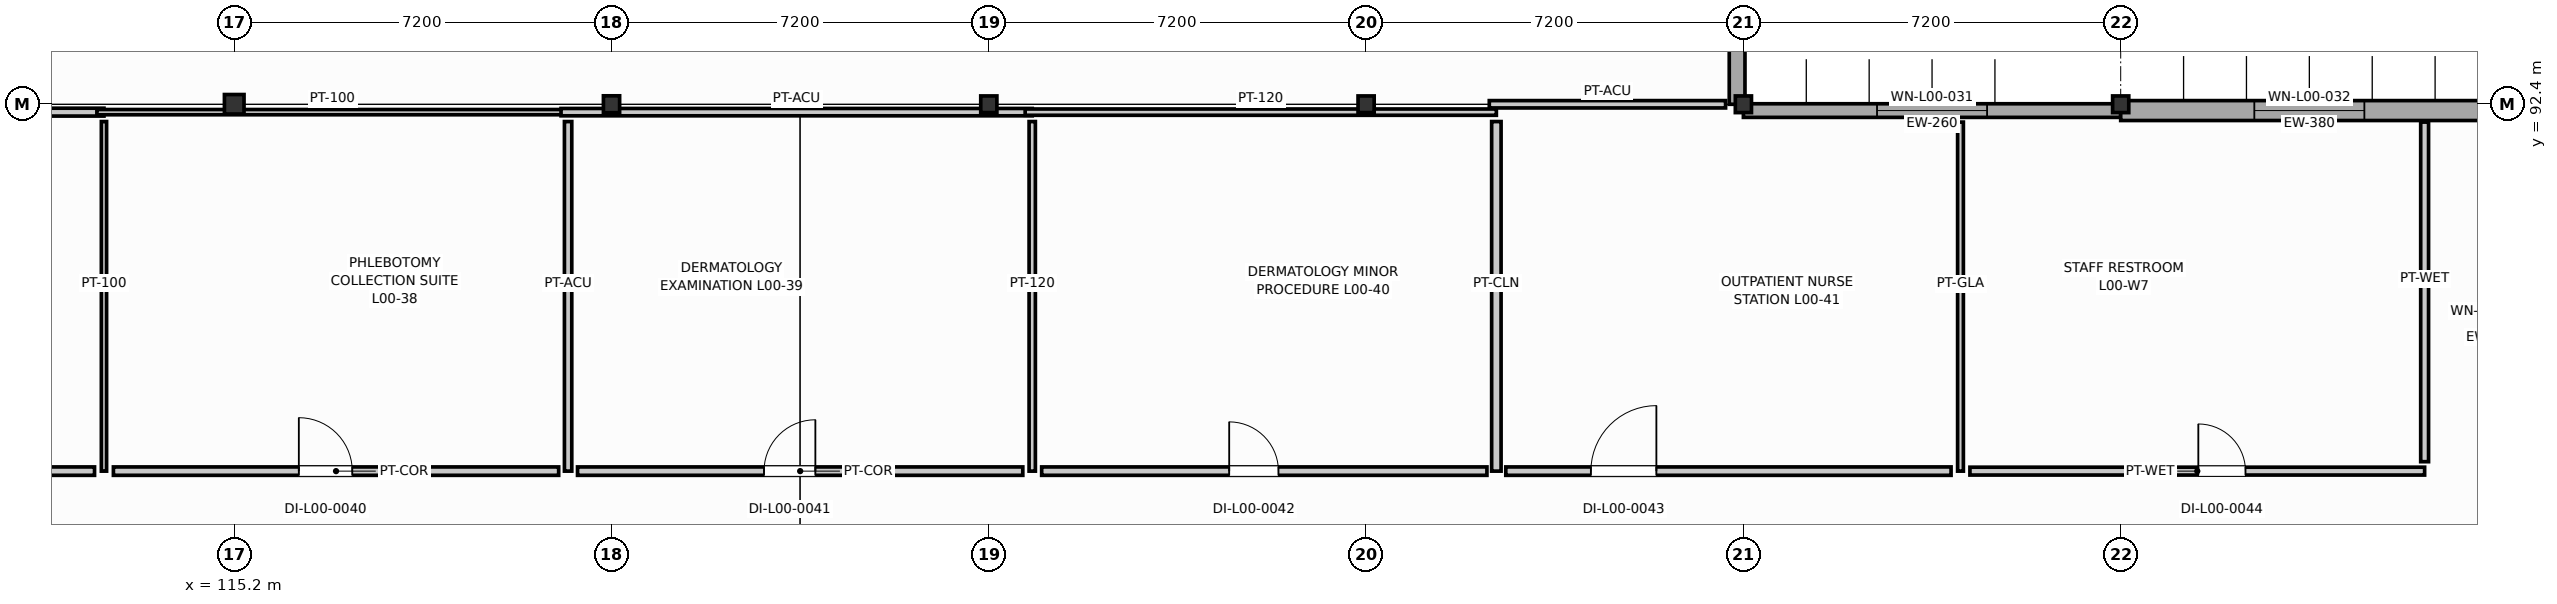
"""IFC4 building model, lengths in metres.
Left out: names, types, materials, properties, quantities, classifications, styles, units other than length and angle.
Written with IfcOpenShell. Run it as: python <this file> out.ifc"""

import sys

from ifc_helpers import new_model, si_unit, direction, frame, frame_2d, origin, origin_2d, place, context, subcontext, project, spatial, rectangle, i_section, extrude, element, fill, save


model = new_model("IFC4")
c1 = context("Model", 3, precision=1e-05, world=origin(), true_north=direction((0.0, 1.0)))
c2 = subcontext(c1, "Body", "Model", "MODEL_VIEW")
j1 = project(units=[si_unit("LENGTHUNIT", "METRE"), si_unit("PLANEANGLEUNIT", "RADIAN")], contexts=[c1])
p1 = place(None, origin())
s1 = spatial("IfcSite", under=j1, at=p1, CompositionType="ELEMENT")
p2 = place(p1, origin())
s2 = spatial("IfcBuilding", under=s1, at=p2, CompositionType="ELEMENT")
p3 = place(p2, origin())
s3 = spatial("IfcBuildingStorey", under=s2, at=p3, CompositionType="ELEMENT", Elevation=0.0)
p4 = place(p3, frame((115.2, 92.4, 0.0), z_axis=(0.0, 0.0, 1.0), x_axis=(1.0, 0.0, 0.0)))
e1 = element("IfcColumn", 1, at=p4, inside=s3, PredefinedType="COLUMN", context=c2, shape_type="SweptSolid", body=[
    extrude(i_section(OverallWidth=0.374, OverallDepth=0.372, WebThickness=0.016, FlangeThickness=0.026, FilletRadius=0.02, at=origin_2d()), origin(), (0.0, 0.0, 1.0), 4.8),
])
p5 = place(p3, frame((122.4, 92.4, 0.0), z_axis=(0.0, 0.0, 1.0), x_axis=(1.0, 0.0, 0.0)))
e2 = element("IfcColumn", 2, at=p5, inside=s3, PredefinedType="COLUMN", context=c2, shape_type="SweptSolid", body=[
    extrude(i_section(OverallWidth=0.309, OverallDepth=0.323, WebThickness=0.014, FlangeThickness=0.023, FilletRadius=0.016, at=origin_2d()), origin(), (0.0, 0.0, 1.0), 4.8),
])
for number, where, z_axis, x_axis in (
    (3, (129.6, 92.4, 0.0), (0.0, 0.0, 1.0), (1.0, 0.0, 0.0)),
    (4, (136.8, 92.4, 0.0), (0.0, 0.0, 1.0), (1.0, 0.0, 0.0)),
    (5, (144.0, 92.4, 0.0), (0.0, 0.0, 1.0), (1.0, 0.0, 0.0)),
    (6, (151.2, 92.4, 0.0), (0.0, 0.0, 1.0), (1.0, 0.0, 0.0)),
):
    element("IfcColumn", number, at=place(p3, frame(where, z_axis=z_axis, x_axis=x_axis)), inside=s3, PredefinedType="COLUMN", context=c2, shape_type="SweptSolid", body=[
        extrude(i_section(OverallWidth=0.308, OverallDepth=0.318, WebThickness=0.013, FlangeThickness=0.021, FilletRadius=0.016, at=origin_2d()), origin(), (0.0, 0.0, 1.0), 4.8),
    ])
p6 = place(p3, frame((143.88, 92.4, 0.0), z_axis=(0.0, 0.0, 1.0), x_axis=(0.0, 1.0, 0.0)))
e7 = element("IfcWall", 7, at=p6, inside=s3, PredefinedType="SOLIDWALL", context=c2, shape_type="SweptSolid", body=[
    extrude(rectangle(XDim=8.4, YDim=0.3, at=frame_2d((4.2, 0.0))), origin(), (0.0, 0.0, 1.0), 3.772),
])
p7 = place(p6, frame((3.15, 0.0, 0.95)))
e8 = element("IfcOpeningElement", 8, at=p7, cuts=e7, PredefinedType="OPENING", context=c2, shape_type="SweptSolid", body=[
    extrude(rectangle(XDim=2.1, YDim=1.15, at=frame_2d((1.05, 0.575))), frame((0.0, 0.16, 0.0), z_axis=(0.0, -1.0, 0.0), x_axis=(1.0, 0.0, 0.0)), (0.0, 0.0, 1.0), 0.32),
])
p8 = place(p3, frame((144.0, 92.28, 0.0), z_axis=(0.0, 0.0, 1.0), x_axis=(1.0, 0.0, 0.0)))
e9 = element("IfcWall", 9, at=p8, inside=s3, PredefinedType="SOLIDWALL", context=c2, shape_type="SweptSolid", body=[
    extrude(rectangle(XDim=7.2, YDim=0.26, at=frame_2d((3.6, 0.0))), origin(), (0.0, 0.0, 1.0), 4.082),
])
p9 = place(p8, frame((2.55, 0.0, 0.95)))
e10 = element("IfcOpeningElement", 10, at=p9, cuts=e9, PredefinedType="OPENING", context=c2, shape_type="SweptSolid", body=[
    extrude(rectangle(XDim=2.1, YDim=1.55, at=frame_2d((1.05, 0.775))), frame((0.0, 0.14, 0.0), z_axis=(0.0, -1.0, 0.0), x_axis=(1.0, 0.0, 0.0)), (0.0, 0.0, 1.0), 0.28),
])
p10 = place(p3, frame((151.2, 92.28, 0.0), z_axis=(0.0, 0.0, 1.0), x_axis=(1.0, 0.0, 0.0)))
e11 = element("IfcWall", 11, at=p10, inside=s3, PredefinedType="SOLIDWALL", context=c2, shape_type="SweptSolid", body=[
    extrude(rectangle(XDim=7.2, YDim=0.38, at=frame_2d((3.6, 0.0))), origin(), (0.0, 0.0, 1.0), 4.082),
])
p11 = place(p10, frame((2.55, 0.0, 0.95)))
e12 = element("IfcOpeningElement", 12, at=p11, cuts=e11, PredefinedType="OPENING", context=c2, shape_type="SweptSolid", body=[
    extrude(rectangle(XDim=2.1, YDim=1.75, at=frame_2d((1.05, 0.875))), frame((0.0, 0.2, 0.0), z_axis=(0.0, -1.0, 0.0), x_axis=(1.0, 0.0, 0.0)), (0.0, 0.0, 1.0), 0.4),
])
p12 = place(p3, frame((103.722, 92.25, 0.0), z_axis=(0.0, 0.0, 1.0), x_axis=(1.0, 0.0, 0.0)))
e13 = element("IfcWall", 13, at=p12, inside=s3, PredefinedType="PLUMBINGWALL", context=c2, shape_type="SweptSolid", body=[
    extrude(rectangle(XDim=8.992, YDim=0.15, at=frame_2d((4.496, 0.0))), origin(), (0.0, 0.0, 1.0), 3.928),
])
p13 = place(p3, frame((112.714, 92.07, 0.0), z_axis=(0.0, 0.0, 1.0), x_axis=(0.0, -1.0, 0.0)))
e14 = element("IfcWall", 14, at=p13, inside=s3, PredefinedType="PARTITIONING", context=c2, shape_type="SweptSolid", body=[
    extrude(rectangle(XDim=6.67, YDim=0.1, at=frame_2d((3.335, 0.0))), origin(), (0.0, 0.0, 1.0), 4.545),
])
p14 = place(p3, frame((112.534, 85.4, 0.0), z_axis=(0.0, 0.0, 1.0), x_axis=(-1.0, 0.0, 0.0)))
e15 = element("IfcWall", 15, at=p14, inside=s3, PredefinedType="PARTITIONING", context=c2, shape_type="SweptSolid", body=[
    extrude(rectangle(XDim=8.497, YDim=0.16, at=frame_2d((4.249, 0.0))), origin(), (0.0, 0.0, 1.0), 3.928),
])
p15 = place(p14, frame((2.519, 0.0, 0.0)))
e16 = element("IfcOpeningElement", 16, at=p15, cuts=e15, PredefinedType="OPENING", context=c2, shape_type="SweptSolid", body=[
    extrude(rectangle(XDim=1.06, YDim=2.05, at=frame_2d((0.53, 1.025))), frame((0.0, 0.09, 0.0), z_axis=(0.0, -1.0, 0.0), x_axis=(1.0, 0.0, 0.0)), (0.0, 0.0, 1.0), 0.18),
])
p16 = place(p3, frame((112.579, 92.25, 0.0), z_axis=(0.0, 0.0, 1.0), x_axis=(1.0, 0.0, 0.0)))
e17 = element("IfcWall", 17, at=p16, inside=s3, PredefinedType="PARTITIONING", context=c2, shape_type="SweptSolid", body=[
    extrude(rectangle(XDim=8.992, YDim=0.1, at=frame_2d((4.496, 0.0))), origin(), (0.0, 0.0, 1.0), 3.694),
])
p17 = place(p3, frame((121.571, 92.07, 0.0), z_axis=(0.0, 0.0, 1.0), x_axis=(0.0, -1.0, 0.0)))
e18 = element("IfcWall", 18, at=p17, inside=s3, PredefinedType="PARTITIONING", context=c2, shape_type="SweptSolid", body=[
    extrude(rectangle(XDim=6.67, YDim=0.14, at=frame_2d((3.335, 0.0))), origin(), (0.0, 0.0, 1.0), 4.545),
])
p18 = place(p3, frame((121.391, 85.4, 0.0), z_axis=(0.0, 0.0, 1.0), x_axis=(-1.0, 0.0, 0.0)))
e19 = element("IfcWall", 19, at=p18, inside=s3, PredefinedType="PARTITIONING", context=c2, shape_type="SweptSolid", body=[
    extrude(rectangle(XDim=8.497, YDim=0.16, at=frame_2d((4.249, 0.0))), origin(), (0.0, 0.0, 1.0), 3.694),
])
p19 = place(p18, frame((3.938, 0.0, 0.0)))
e20 = element("IfcOpeningElement", 20, at=p19, cuts=e19, PredefinedType="OPENING", context=c2, shape_type="SweptSolid", body=[
    extrude(rectangle(XDim=1.02, YDim=2.05, at=frame_2d((0.51, 1.025))), frame((0.0, 0.09, 0.0), z_axis=(0.0, -1.0, 0.0), x_axis=(1.0, 0.0, 0.0)), (0.0, 0.0, 1.0), 0.18),
])
p20 = place(p3, frame((121.436, 92.25, 0.0), z_axis=(0.0, 0.0, 1.0), x_axis=(1.0, 0.0, 0.0)))
e21 = element("IfcWall", 21, at=p20, inside=s3, PredefinedType="PARTITIONING", context=c2, shape_type="SweptSolid", body=[
    extrude(rectangle(XDim=8.992, YDim=0.14, at=frame_2d((4.496, 0.0))), origin(), (0.0, 0.0, 1.0), 3.618),
])
p21 = place(p3, frame((130.429, 92.07, 0.0), z_axis=(0.0, 0.0, 1.0), x_axis=(0.0, -1.0, 0.0)))
e22 = element("IfcWall", 22, at=p21, inside=s3, PredefinedType="PARTITIONING", context=c2, shape_type="SweptSolid", body=[
    extrude(rectangle(XDim=6.67, YDim=0.12, at=frame_2d((3.335, 0.0))), origin(), (0.0, 0.0, 1.0), 4.545),
])
p22 = place(p3, frame((130.249, 85.4, 0.0), z_axis=(0.0, 0.0, 1.0), x_axis=(-1.0, 0.0, 0.0)))
e23 = element("IfcWall", 23, at=p22, inside=s3, PredefinedType="PARTITIONING", context=c2, shape_type="SweptSolid", body=[
    extrude(rectangle(XDim=8.497, YDim=0.16, at=frame_2d((4.249, 0.0))), origin(), (0.0, 0.0, 1.0), 4.001),
])
p23 = place(p22, frame((3.958, 0.0, 0.0)))
e24 = element("IfcOpeningElement", 24, at=p23, cuts=e23, PredefinedType="OPENING", context=c2, shape_type="SweptSolid", body=[
    extrude(rectangle(XDim=0.98, YDim=2.05, at=frame_2d((0.49, 1.025))), frame((0.0, 0.09, 0.0), z_axis=(0.0, -1.0, 0.0), x_axis=(1.0, 0.0, 0.0)), (0.0, 0.0, 1.0), 0.18),
])
p24 = place(p3, frame((130.294, 92.25, 0.0), z_axis=(0.0, 0.0, 1.0), x_axis=(1.0, 0.0, 0.0)))
e25 = element("IfcWall", 25, at=p24, inside=s3, PredefinedType="PARTITIONING", context=c2, shape_type="SweptSolid", body=[
    extrude(rectangle(XDim=8.992, YDim=0.12, at=frame_2d((4.496, 0.0))), origin(), (0.0, 0.0, 1.0), 3.618),
])
p25 = place(p3, frame((139.286, 92.07, 0.0), z_axis=(0.0, 0.0, 1.0), x_axis=(0.0, -1.0, 0.0)))
e26 = element("IfcWall", 26, at=p25, inside=s3, PredefinedType="PARTITIONING", context=c2, shape_type="SweptSolid", body=[
    extrude(rectangle(XDim=6.67, YDim=0.18, at=frame_2d((3.335, 0.0))), origin(), (0.0, 0.0, 1.0), 4.545),
])
p26 = place(p3, frame((139.106, 85.4, 0.0), z_axis=(0.0, 0.0, 1.0), x_axis=(-1.0, 0.0, 0.0)))
e27 = element("IfcWall", 27, at=p26, inside=s3, PredefinedType="PARTITIONING", context=c2, shape_type="SweptSolid", body=[
    extrude(rectangle(XDim=8.497, YDim=0.16, at=frame_2d((4.249, 0.0))), origin(), (0.0, 0.0, 1.0), 3.694),
])
p27 = place(p26, frame((3.979, 0.0, 0.0)))
e28 = element("IfcOpeningElement", 28, at=p27, cuts=e27, PredefinedType="OPENING", context=c2, shape_type="SweptSolid", body=[
    extrude(rectangle(XDim=0.94, YDim=2.05, at=frame_2d((0.47, 1.025))), frame((0.0, 0.09, 0.0), z_axis=(0.0, -1.0, 0.0), x_axis=(1.0, 0.0, 0.0)), (0.0, 0.0, 1.0), 0.18),
])
p28 = place(p3, frame((148.143, 92.06, 0.0), z_axis=(0.0, 0.0, 1.0), x_axis=(0.0, -1.0, 0.0)))
e29 = element("IfcWall", 29, at=p28, inside=s3, PredefinedType="MOVABLE", context=c2, shape_type="SweptSolid", body=[
    extrude(rectangle(XDim=6.66, YDim=0.11, at=frame_2d((3.33, 0.0))), origin(), (0.0, 0.0, 1.0), 4.545),
])
p29 = place(p3, frame((147.963, 85.4, 0.0), z_axis=(0.0, 0.0, 1.0), x_axis=(-1.0, 0.0, 0.0)))
e30 = element("IfcWall", 30, at=p29, inside=s3, PredefinedType="PARTITIONING", context=c2, shape_type="SweptSolid", body=[
    extrude(rectangle(XDim=8.497, YDim=0.16, at=frame_2d((4.249, 0.0))), origin(), (0.0, 0.0, 1.0), 3.775),
])
p30 = place(p29, frame((5.624, 0.0, 0.0)))
e31 = element("IfcOpeningElement", 31, at=p30, cuts=e30, PredefinedType="OPENING", context=c2, shape_type="SweptSolid", body=[
    extrude(rectangle(XDim=1.25, YDim=2.15, at=frame_2d((0.625, 1.075))), frame((0.0, 0.09, 0.0), z_axis=(0.0, -1.0, 0.0), x_axis=(1.0, 0.0, 0.0)), (0.0, 0.0, 1.0), 0.18),
])
p31 = place(p3, frame((139.151, 92.4, 0.0), z_axis=(0.0, 0.0, 1.0), x_axis=(1.0, 0.0, 0.0)))
e32 = element("IfcWall", 32, at=p31, inside=s3, PredefinedType="PARTITIONING", context=c2, shape_type="SweptSolid", body=[
    extrude(rectangle(XDim=4.509, YDim=0.14, at=frame_2d((2.255, 0.0))), origin(), (0.0, 0.0, 1.0), 4.132),
])
p32 = place(p3, frame((157.0, 85.4, 0.0), z_axis=(0.0, 0.0, 1.0), x_axis=(-1.0, 0.0, 0.0)))
e33 = element("IfcWall", 33, at=p32, inside=s3, PredefinedType="PLUMBINGWALL", context=c2, shape_type="SweptSolid", body=[
    extrude(rectangle(XDim=8.677, YDim=0.15, at=frame_2d((4.338, 0.0))), origin(), (0.0, 0.0, 1.0), 4.001),
])
p33 = place(p32, frame((3.419, 0.0, 0.0)))
e34 = element("IfcOpeningElement", 34, at=p33, cuts=e33, PredefinedType="OPENING", context=c2, shape_type="SweptSolid", body=[
    extrude(rectangle(XDim=0.9, YDim=2.1, at=frame_2d((0.45, 1.05))), frame((0.0, 0.085, 0.0), z_axis=(0.0, -1.0, 0.0), x_axis=(1.0, 0.0, 0.0)), (0.0, 0.0, 1.0), 0.17),
])
p34 = place(p3, frame((157.0, 92.06, 0.0), z_axis=(0.0, 0.0, 1.0), x_axis=(0.0, -1.0, 0.0)))
e35 = element("IfcWall", 35, at=p34, inside=s3, PredefinedType="PLUMBINGWALL", context=c2, shape_type="SweptSolid", body=[
    extrude(rectangle(XDim=6.48, YDim=0.15, at=frame_2d((3.24, 0.0))), origin(), (0.0, 0.0, 1.0), 4.545),
])
p35 = place(p9, origin())
e36 = element("IfcWindow", 36, at=p35, inside=s3, PartitioningType="SINGLE_PANEL", PredefinedType="WINDOW", context=c2, shape_type="SweptSolid", body=[
    extrude(rectangle(XDim=2.1, YDim=1.55, at=frame_2d((1.05, 0.775))), frame((0.0, 0.03, 0.0), z_axis=(0.0, -1.0, 0.0), x_axis=(1.0, 0.0, 0.0)), (0.0, 0.0, 1.0), 0.06),
])
fill(e10, e36)
p36 = place(p11, origin())
e37 = element("IfcWindow", 37, at=p36, inside=s3, PartitioningType="SINGLE_PANEL", PredefinedType="WINDOW", context=c2, shape_type="SweptSolid", body=[
    extrude(rectangle(XDim=2.1, YDim=1.75, at=frame_2d((1.05, 0.875))), frame((0.0, 0.03, 0.0), z_axis=(0.0, -1.0, 0.0), x_axis=(1.0, 0.0, 0.0)), (0.0, 0.0, 1.0), 0.06),
])
fill(e12, e37)
p37 = place(p19, frame((1.02, 0.0, 0.0), z_axis=(0.0, 0.0, 1.0), x_axis=(-1.0, 0.0, 0.0)))
e38 = element("IfcDoor", 38, at=p37, inside=s3, OperationType="SINGLE_SWING_LEFT", PredefinedType="DOOR", context=c2, shape_type="SweptSolid", body=[
    extrude(rectangle(XDim=1.02, YDim=2.05, at=frame_2d((0.51, 1.025))), frame((0.0, 0.025, 0.0), z_axis=(0.0, -1.0, 0.0), x_axis=(1.0, 0.0, 0.0)), (0.0, 0.0, 1.0), 0.05),
])
fill(e20, e38)
p38 = place(p23, frame((0.98, 0.0, 0.0), z_axis=(0.0, 0.0, 1.0), x_axis=(-1.0, 0.0, 0.0)))
e39 = element("IfcDoor", 39, at=p38, inside=s3, OperationType="SINGLE_SWING_RIGHT", PredefinedType="DOOR", context=c2, shape_type="SweptSolid", body=[
    extrude(rectangle(XDim=0.98, YDim=2.05, at=frame_2d((0.49, 1.025))), frame((0.0, 0.025, 0.0), z_axis=(0.0, -1.0, 0.0), x_axis=(1.0, 0.0, 0.0)), (0.0, 0.0, 1.0), 0.05),
])
fill(e24, e39)
p39 = place(p27, frame((0.94, 0.0, 0.0), z_axis=(0.0, 0.0, 1.0), x_axis=(-1.0, 0.0, 0.0)))
e40 = element("IfcDoor", 40, at=p39, inside=s3, OperationType="SINGLE_SWING_LEFT", PredefinedType="DOOR", context=c2, shape_type="SweptSolid", body=[
    extrude(rectangle(XDim=0.94, YDim=2.05, at=frame_2d((0.47, 1.025))), frame((0.0, 0.025, 0.0), z_axis=(0.0, -1.0, 0.0), x_axis=(1.0, 0.0, 0.0)), (0.0, 0.0, 1.0), 0.05),
])
fill(e28, e40)
p40 = place(p30, frame((1.25, 0.0, 0.0), z_axis=(0.0, 0.0, 1.0), x_axis=(-1.0, 0.0, 0.0)))
e41 = element("IfcDoor", 41, at=p40, inside=s3, OperationType="SINGLE_SWING_RIGHT", PredefinedType="DOOR", context=c2, shape_type="SweptSolid", body=[
    extrude(rectangle(XDim=1.25, YDim=2.15, at=frame_2d((0.625, 1.075))), frame((0.0, 0.025, 0.0), z_axis=(0.0, -1.0, 0.0), x_axis=(1.0, 0.0, 0.0)), (0.0, 0.0, 1.0), 0.05),
])
fill(e31, e41)
p41 = place(p33, frame((0.9, 0.0, 0.0), z_axis=(0.0, 0.0, 1.0), x_axis=(-1.0, 0.0, 0.0)))
e42 = element("IfcDoor", 42, at=p41, inside=s3, OperationType="SINGLE_SWING_LEFT", PredefinedType="DOOR", context=c2, shape_type="SweptSolid", body=[
    extrude(rectangle(XDim=0.9, YDim=2.1, at=frame_2d((0.45, 1.05))), frame((0.0, 0.025, 0.0), z_axis=(0.0, -1.0, 0.0), x_axis=(1.0, 0.0, 0.0)), (0.0, 0.0, 1.0), 0.05),
])
fill(e34, e42)
save(model, sys.argv[1])
